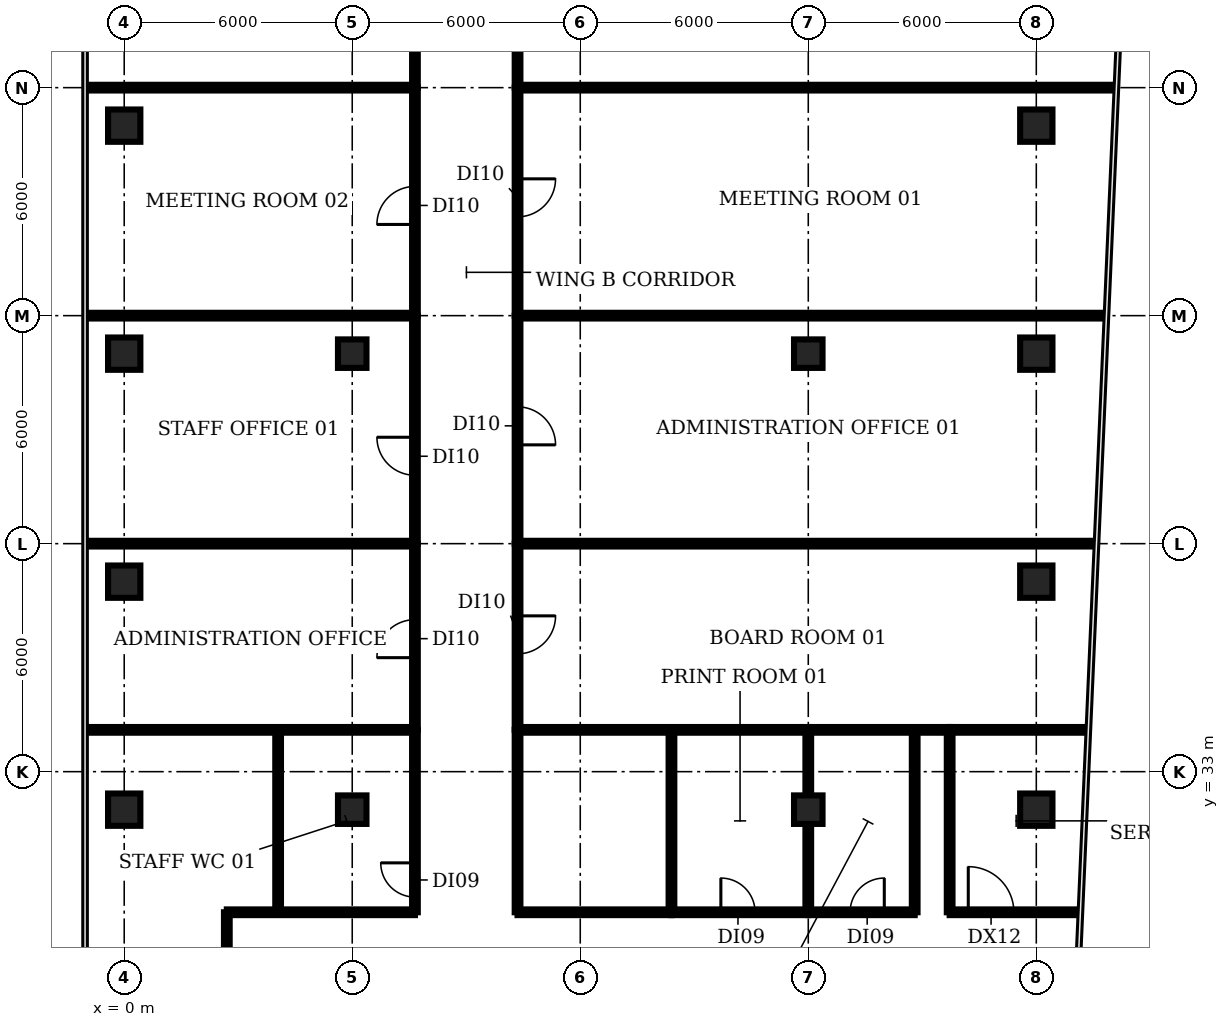
"""IFC4 building model, lengths in metres.
Left out: names, types, materials, properties, quantities, classifications, styles, units other than length and angle.
Written with IfcOpenShell. Run it as: python <this file> out.ifc"""

import sys

from ifc_helpers import new_model, si_unit, direction, frame, frame_2d, origin, origin_2d, place, context, subcontext, project, spatial, rectangle, extrude, element, fill, save


model = new_model("IFC4")
c1 = context("Model", 3, precision=1e-05, world=origin(), true_north=direction((0.0, 1.0)))
c2 = subcontext(c1, "Body", "Model", "MODEL_VIEW")
j1 = project(units=[si_unit("LENGTHUNIT", "METRE"), si_unit("PLANEANGLEUNIT", "RADIAN")], contexts=[c1])
p1 = place(None, origin())
s1 = spatial("IfcSite", under=j1, at=p1, CompositionType="ELEMENT")
p2 = place(p1, origin())
s2 = spatial("IfcBuilding", under=s1, at=p2, CompositionType="ELEMENT")
p3 = place(p2, frame((0.0, 0.0, 159.2)))
s3 = spatial("IfcBuildingStorey", under=s2, at=p3, CompositionType="ELEMENT", Elevation=159.2)
for number, where, z_axis, x_axis in (
    (1, (0.0, 32.0, 0.0), (0.0, 0.0, 1.0), (1.0, 0.0, 0.0)),
    (2, (0.0, 38.0, 0.0), (0.0, 0.0, 1.0), (1.0, 0.0, 0.0)),
    (3, (0.0, 44.0, 0.0), (0.0, 0.0, 1.0), (1.0, 0.0, 0.0)),
    (4, (0.0, 50.0, 0.0), (0.0, 0.0, 1.0), (1.0, 0.0, 0.0)),
):
    element("IfcColumn", number, at=place(p3, frame(where, z_axis=z_axis, x_axis=x_axis)), inside=s3, PredefinedType="COLUMN", context=c2, shape_type="SweptSolid", body=[
        extrude(rectangle(XDim=0.85, YDim=0.85, at=origin_2d()), origin(), (0.0, 0.0, 1.0), 3.85),
    ])
for number, where, z_axis, x_axis in (
    (5, (6.0, 32.0, 0.0), (0.0, 0.0, 1.0), (1.0, 0.0, 0.0)),
    (6, (6.0, 44.0, 0.0), (0.0, 0.0, 1.0), (1.0, 0.0, 0.0)),
    (7, (18.0, 32.0, 0.0), (0.0, 0.0, 1.0), (1.0, 0.0, 0.0)),
    (8, (18.0, 44.0, 0.0), (0.0, 0.0, 1.0), (1.0, 0.0, 0.0)),
):
    element("IfcColumn", number, at=place(p3, frame(where, z_axis=z_axis, x_axis=x_axis)), inside=s3, PredefinedType="COLUMN", context=c2, shape_type="SweptSolid", body=[
        extrude(rectangle(XDim=0.75, YDim=0.75, at=origin_2d()), origin(), (0.0, 0.0, 1.0), 3.85),
    ])
for number, where, z_axis, x_axis in (
    (9, (24.0, 32.0, 0.0), (0.0, 0.0, 1.0), (1.0, 0.0, 0.0)),
    (10, (24.0, 38.0, 0.0), (0.0, 0.0, 1.0), (1.0, 0.0, 0.0)),
    (11, (24.0, 44.0, 0.0), (0.0, 0.0, 1.0), (1.0, 0.0, 0.0)),
    (12, (24.0, 50.0, 0.0), (0.0, 0.0, 1.0), (1.0, 0.0, 0.0)),
):
    element("IfcColumn", number, at=place(p3, frame(where, z_axis=z_axis, x_axis=x_axis)), inside=s3, PredefinedType="COLUMN", context=c2, shape_type="SweptSolid", body=[
        extrude(rectangle(XDim=0.85, YDim=0.85, at=origin_2d()), origin(), (0.0, 0.0, 1.0), 3.85),
    ])
p4 = place(p3, frame((-0.98, 34.1, 0.0), z_axis=(0.0, 0.0, 1.0), x_axis=(1.0, 0.0, 0.0)))
e13 = element("IfcWall", 13, at=p4, inside=s3, PredefinedType="PARTITIONING", context=c2, shape_type="SweptSolid", body=[
    extrude(rectangle(XDim=8.63, YDim=0.15, at=frame_2d((4.315, 0.0))), origin(), (0.0, 0.0, 1.0), 2.88),
])
for number, where, z_axis, x_axis in (
    (14, (-0.965, 39.0, 0.0), (0.0, 0.0, 1.0), (1.0, 0.0, 0.0)),
    (15, (-0.965, 45.0, 0.0), (0.0, 0.0, 1.0), (1.0, 0.0, 0.0)),
    (16, (-0.965, 51.0, 0.0), (0.0, 0.0, 1.0), (1.0, 0.0, 0.0)),
):
    element("IfcWall", number, at=place(p3, frame(where, z_axis=z_axis, x_axis=x_axis)), inside=s3, PredefinedType="PARTITIONING", context=c2, shape_type="SweptSolid", body=[
        extrude(rectangle(XDim=8.615, YDim=0.15, at=frame_2d((4.308, 0.0))), origin(), (0.0, 0.0, 1.0), 2.88),
    ])
p5 = place(p3, frame((2.7, 25.4, 0.0), z_axis=(0.0, 0.0, 1.0), x_axis=(0.0, 1.0, 0.0)))
e17 = element("IfcWall", 17, at=p5, inside=s3, PredefinedType="PARTITIONING", context=c2, shape_type="SweptSolid", body=[
    extrude(rectangle(XDim=3.9, YDim=0.15, at=frame_2d((1.95, 0.0))), origin(), (0.0, 0.0, 1.0), 2.88),
])
p6 = place(p3, frame((2.7, 29.3, 0.0), z_axis=(0.0, 0.0, 1.0), x_axis=(1.0, 0.0, 0.0)))
e18 = element("IfcWall", 18, at=p6, inside=s3, PredefinedType="PARTITIONING", context=c2, shape_type="SweptSolid", body=[
    extrude(rectangle(XDim=4.95, YDim=0.15, at=frame_2d((2.475, 0.0))), origin(), (0.0, 0.0, 1.0), 2.88),
])
p7 = place(p3, frame((4.05, 29.3, 0.0), z_axis=(0.0, 0.0, 1.0), x_axis=(0.0, 1.0, 0.0)))
e19 = element("IfcWall", 19, at=p7, inside=s3, PredefinedType="PARTITIONING", context=c2, shape_type="SweptSolid", body=[
    extrude(rectangle(XDim=4.8, YDim=0.15, at=frame_2d((2.4, 0.0))), origin(), (0.0, 0.0, 1.0), 2.88),
])
p8 = place(p3, frame((7.65, 29.3, 0.0), z_axis=(0.0, 0.0, 1.0), x_axis=(0.0, 1.0, 0.0)))
e20 = element("IfcWall", 20, at=p8, inside=s3, PredefinedType="PARTITIONING", context=c2, shape_type="SweptSolid", body=[
    extrude(rectangle(XDim=4.8, YDim=0.15, at=frame_2d((2.4, 0.0))), origin(), (0.0, 0.0, 1.0), 2.88),
])
p9 = place(p8, frame((0.4, 0.0, 0.0)))
e21 = element("IfcOpeningElement", 21, at=p9, cuts=e20, PredefinedType="OPENING", context=c2, shape_type="SweptSolid", body=[
    extrude(rectangle(XDim=0.9, YDim=2.1, at=frame_2d((0.45, 1.05))), frame((0.0, 0.085, 0.0), z_axis=(0.0, -1.0, 0.0), x_axis=(1.0, 0.0, 0.0)), (0.0, 0.0, 1.0), 0.17),
])
p10 = place(p3, frame((7.65, 34.1, 0.0), z_axis=(0.0, 0.0, 1.0), x_axis=(0.0, 1.0, 0.0)))
e22 = element("IfcWall", 22, at=p10, inside=s3, PredefinedType="PARTITIONING", context=c2, shape_type="SweptSolid", body=[
    extrude(rectangle(XDim=4.9, YDim=0.15, at=frame_2d((2.45, 0.0))), origin(), (0.0, 0.0, 1.0), 2.88),
])
p11 = place(p10, frame((1.9, 0.0, 0.0)))
e23 = element("IfcOpeningElement", 23, at=p11, cuts=e22, PredefinedType="OPENING", context=c2, shape_type="SweptSolid", body=[
    extrude(rectangle(XDim=1.0, YDim=2.1, at=frame_2d((0.5, 1.05))), frame((0.0, 0.085, 0.0), z_axis=(0.0, -1.0, 0.0), x_axis=(1.0, 0.0, 0.0)), (0.0, 0.0, 1.0), 0.17),
])
p12 = place(p3, frame((7.65, 39.0, 0.0), z_axis=(0.0, 0.0, 1.0), x_axis=(0.0, 1.0, 0.0)))
e24 = element("IfcWall", 24, at=p12, inside=s3, PredefinedType="PARTITIONING", context=c2, shape_type="SweptSolid", body=[
    extrude(rectangle(XDim=6.0, YDim=0.15, at=frame_2d((3.0, 0.0))), origin(), (0.0, 0.0, 1.0), 2.88),
])
p13 = place(p12, frame((1.8, 0.0, 0.0)))
e25 = element("IfcOpeningElement", 25, at=p13, cuts=e24, PredefinedType="OPENING", context=c2, shape_type="SweptSolid", body=[
    extrude(rectangle(XDim=1.0, YDim=2.1, at=frame_2d((0.5, 1.05))), frame((0.0, 0.085, 0.0), z_axis=(0.0, -1.0, 0.0), x_axis=(1.0, 0.0, 0.0)), (0.0, 0.0, 1.0), 0.17),
])
p14 = place(p3, frame((7.65, 45.0, 0.0), z_axis=(0.0, 0.0, 1.0), x_axis=(0.0, 1.0, 0.0)))
e26 = element("IfcWall", 26, at=p14, inside=s3, PredefinedType="PARTITIONING", context=c2, shape_type="SweptSolid", body=[
    extrude(rectangle(XDim=6.0, YDim=0.15, at=frame_2d((3.0, 0.0))), origin(), (0.0, 0.0, 1.0), 2.88),
])
p15 = place(p14, frame((2.4, 0.0, 0.0)))
e27 = element("IfcOpeningElement", 27, at=p15, cuts=e26, PredefinedType="OPENING", context=c2, shape_type="SweptSolid", body=[
    extrude(rectangle(XDim=1.0, YDim=2.1, at=frame_2d((0.5, 1.05))), frame((0.0, 0.085, 0.0), z_axis=(0.0, -1.0, 0.0), x_axis=(1.0, 0.0, 0.0)), (0.0, 0.0, 1.0), 0.17),
])
p16 = place(p3, frame((7.65, 51.0, 0.0), z_axis=(0.0, 0.0, 1.0), x_axis=(0.0, 1.0, 0.0)))
e28 = element("IfcWall", 28, at=p16, inside=s3, PredefinedType="PARTITIONING", context=c2, shape_type="SweptSolid", body=[
    extrude(rectangle(XDim=12.09, YDim=0.15, at=frame_2d((6.045, 0.0))), origin(), (0.0, 0.0, 1.0), 2.88),
])
p17 = place(p16, frame((6.98, 0.0, 0.0)))
e29 = element("IfcOpeningElement", 29, at=p17, cuts=e28, PredefinedType="OPENING", context=c2, shape_type="SweptSolid", body=[
    extrude(rectangle(XDim=1.2, YDim=2.1, at=frame_2d((0.6, 1.05))), frame((0.0, 0.085, 0.0), z_axis=(0.0, -1.0, 0.0), x_axis=(1.0, 0.0, 0.0)), (0.0, 0.0, 1.0), 0.17),
])
p18 = place(p3, frame((10.35, 29.3, 0.0), z_axis=(0.0, 0.0, 1.0), x_axis=(0.0, 1.0, 0.0)))
e30 = element("IfcWall", 30, at=p18, inside=s3, PredefinedType="PARTITIONING", context=c2, shape_type="SweptSolid", body=[
    extrude(rectangle(XDim=4.8, YDim=0.15, at=frame_2d((2.4, 0.0))), origin(), (0.0, 0.0, 1.0), 2.88),
])
p19 = place(p3, frame((10.35, 29.3, 0.0), z_axis=(0.0, 0.0, 1.0), x_axis=(1.0, 0.0, 0.0)))
e31 = element("IfcWall", 31, at=p19, inside=s3, PredefinedType="PARTITIONING", context=c2, shape_type="SweptSolid", body=[
    extrude(rectangle(XDim=4.05, YDim=0.15, at=frame_2d((2.025, 0.0))), origin(), (0.0, 0.0, 1.0), 2.88),
])
p20 = place(p3, frame((10.35, 34.1, 0.0), z_axis=(0.0, 0.0, 1.0), x_axis=(1.0, 0.0, 0.0)))
e32 = element("IfcWall", 32, at=p20, inside=s3, PredefinedType="PARTITIONING", context=c2, shape_type="SweptSolid", body=[
    extrude(rectangle(XDim=11.37, YDim=0.15, at=frame_2d((5.685, 0.0))), origin(), (0.0, 0.0, 1.0), 2.88),
])
p21 = place(p3, frame((10.35, 39.0, 0.0), z_axis=(0.0, 0.0, 1.0), x_axis=(0.0, -1.0, 0.0)))
e33 = element("IfcWall", 33, at=p21, inside=s3, PredefinedType="PARTITIONING", context=c2, shape_type="SweptSolid", body=[
    extrude(rectangle(XDim=4.9, YDim=0.15, at=frame_2d((2.45, 0.0))), origin(), (0.0, 0.0, 1.0), 2.88),
])
p22 = place(p21, frame((1.9, 0.0, 0.0)))
e34 = element("IfcOpeningElement", 34, at=p22, cuts=e33, PredefinedType="OPENING", context=c2, shape_type="SweptSolid", body=[
    extrude(rectangle(XDim=1.0, YDim=2.1, at=frame_2d((0.5, 1.05))), frame((0.0, 0.085, 0.0), z_axis=(0.0, -1.0, 0.0), x_axis=(1.0, 0.0, 0.0)), (0.0, 0.0, 1.0), 0.17),
])
p23 = place(p3, frame((10.35, 39.0, 0.0), z_axis=(0.0, 0.0, 1.0), x_axis=(1.0, 0.0, 0.0)))
e35 = element("IfcWall", 35, at=p23, inside=s3, PredefinedType="PARTITIONING", context=c2, shape_type="SweptSolid", body=[
    extrude(rectangle(XDim=15.18, YDim=0.15, at=frame_2d((7.59, 0.0))), origin(), (0.0, 0.0, 1.0), 2.88),
])
p24 = place(p3, frame((10.35, 45.0, 0.0), z_axis=(0.0, 0.0, 1.0), x_axis=(0.0, -1.0, 0.0)))
e36 = element("IfcWall", 36, at=p24, inside=s3, PredefinedType="PARTITIONING", context=c2, shape_type="SweptSolid", body=[
    extrude(rectangle(XDim=6.0, YDim=0.15, at=frame_2d((3.0, 0.0))), origin(), (0.0, 0.0, 1.0), 2.88),
])
p25 = place(p24, frame((2.4, 0.0, 0.0)))
e37 = element("IfcOpeningElement", 37, at=p25, cuts=e36, PredefinedType="OPENING", context=c2, shape_type="SweptSolid", body=[
    extrude(rectangle(XDim=1.0, YDim=2.1, at=frame_2d((0.5, 1.05))), frame((0.0, 0.085, 0.0), z_axis=(0.0, -1.0, 0.0), x_axis=(1.0, 0.0, 0.0)), (0.0, 0.0, 1.0), 0.17),
])
p26 = place(p3, frame((10.35, 45.0, 0.0), z_axis=(0.0, 0.0, 1.0), x_axis=(1.0, 0.0, 0.0)))
e38 = element("IfcWall", 38, at=p26, inside=s3, PredefinedType="PARTITIONING", context=c2, shape_type="SweptSolid", body=[
    extrude(rectangle(XDim=15.45, YDim=0.15, at=frame_2d((7.725, 0.0))), origin(), (0.0, 0.0, 1.0), 2.88),
])
p27 = place(p3, frame((10.35, 51.0, 0.0), z_axis=(0.0, 0.0, 1.0), x_axis=(0.0, -1.0, 0.0)))
e39 = element("IfcWall", 39, at=p27, inside=s3, PredefinedType="PARTITIONING", context=c2, shape_type="SweptSolid", body=[
    extrude(rectangle(XDim=6.0, YDim=0.15, at=frame_2d((3.0, 0.0))), origin(), (0.0, 0.0, 1.0), 2.88),
])
p28 = place(p27, frame((2.4, 0.0, 0.0)))
e40 = element("IfcOpeningElement", 40, at=p28, cuts=e39, PredefinedType="OPENING", context=c2, shape_type="SweptSolid", body=[
    extrude(rectangle(XDim=1.0, YDim=2.1, at=frame_2d((0.5, 1.05))), frame((0.0, 0.085, 0.0), z_axis=(0.0, -1.0, 0.0), x_axis=(1.0, 0.0, 0.0)), (0.0, 0.0, 1.0), 0.17),
])
p29 = place(p3, frame((10.35, 51.0, 0.0), z_axis=(0.0, 0.0, 1.0), x_axis=(1.0, 0.0, 0.0)))
e41 = element("IfcWall", 41, at=p29, inside=s3, PredefinedType="PARTITIONING", context=c2, shape_type="SweptSolid", body=[
    extrude(rectangle(XDim=15.71, YDim=0.15, at=frame_2d((7.855, 0.0))), origin(), (0.0, 0.0, 1.0), 2.88),
])
p30 = place(p3, frame((10.35, 63.09, 0.0), z_axis=(0.0, 0.0, 1.0), x_axis=(0.0, -1.0, 0.0)))
e42 = element("IfcWall", 42, at=p30, inside=s3, PredefinedType="PARTITIONING", context=c2, shape_type="SweptSolid", body=[
    extrude(rectangle(XDim=12.09, YDim=0.15, at=frame_2d((6.045, 0.0))), origin(), (0.0, 0.0, 1.0), 2.88),
])
p31 = place(p30, frame((5.59, 0.0, 0.0)))
e43 = element("IfcOpeningElement", 43, at=p31, cuts=e42, PredefinedType="OPENING", context=c2, shape_type="SweptSolid", body=[
    extrude(rectangle(XDim=1.2, YDim=2.1, at=frame_2d((0.6, 1.05))), frame((0.0, 0.085, 0.0), z_axis=(0.0, -1.0, 0.0), x_axis=(1.0, 0.0, 0.0)), (0.0, 0.0, 1.0), 0.17),
])
p32 = place(p3, frame((14.4, 29.3, 0.0), z_axis=(0.0, 0.0, 1.0), x_axis=(0.0, 1.0, 0.0)))
e44 = element("IfcWall", 44, at=p32, inside=s3, PredefinedType="PARTITIONING", context=c2, shape_type="SweptSolid", body=[
    extrude(rectangle(XDim=4.8, YDim=0.15, at=frame_2d((2.4, 0.0))), origin(), (0.0, 0.0, 1.0), 2.88),
])
p33 = place(p3, frame((14.4, 29.3, 0.0), z_axis=(0.0, 0.0, 1.0), x_axis=(1.0, 0.0, 0.0)))
e45 = element("IfcWall", 45, at=p33, inside=s3, PredefinedType="PARTITIONING", context=c2, shape_type="SweptSolid", body=[
    extrude(rectangle(XDim=3.6, YDim=0.15, at=frame_2d((1.8, 0.0))), origin(), (0.0, 0.0, 1.0), 2.88),
])
p34 = place(p33, frame((1.3, 0.0, 0.0)))
e46 = element("IfcOpeningElement", 46, at=p34, cuts=e45, PredefinedType="OPENING", context=c2, shape_type="SweptSolid", body=[
    extrude(rectangle(XDim=0.9, YDim=2.1, at=frame_2d((0.45, 1.05))), frame((0.0, 0.085, 0.0), z_axis=(0.0, -1.0, 0.0), x_axis=(1.0, 0.0, 0.0)), (0.0, 0.0, 1.0), 0.17),
])
p35 = place(p3, frame((18.0, 29.3, 0.0), z_axis=(0.0, 0.0, 1.0), x_axis=(0.0, 1.0, 0.0)))
e47 = element("IfcWall", 47, at=p35, inside=s3, PredefinedType="PARTITIONING", context=c2, shape_type="SweptSolid", body=[
    extrude(rectangle(XDim=4.8, YDim=0.15, at=frame_2d((2.4, 0.0))), origin(), (0.0, 0.0, 1.0), 2.88),
])
p36 = place(p3, frame((18.0, 29.3, 0.0), z_axis=(0.0, 0.0, 1.0), x_axis=(1.0, 0.0, 0.0)))
e48 = element("IfcWall", 48, at=p36, inside=s3, PredefinedType="PARTITIONING", context=c2, shape_type="SweptSolid", body=[
    extrude(rectangle(XDim=2.8, YDim=0.15, at=frame_2d((1.4, 0.0))), origin(), (0.0, 0.0, 1.0), 2.88),
])
p37 = place(p36, frame((1.1, 0.0, 0.0)))
e49 = element("IfcOpeningElement", 49, at=p37, cuts=e48, PredefinedType="OPENING", context=c2, shape_type="SweptSolid", body=[
    extrude(rectangle(XDim=0.9, YDim=2.1, at=frame_2d((0.45, 1.05))), frame((0.0, 0.085, 0.0), z_axis=(0.0, -1.0, 0.0), x_axis=(1.0, 0.0, 0.0)), (0.0, 0.0, 1.0), 0.17),
])
for number, where, z_axis, x_axis in (
    (50, (20.8, 29.3, 0.0), (0.0, 0.0, 1.0), (0.0, 1.0, 0.0)),
    (51, (21.72, 29.3, 0.0), (0.0, 0.0, 1.0), (0.0, 1.0, 0.0)),
):
    element("IfcWall", number, at=place(p3, frame(where, z_axis=z_axis, x_axis=x_axis)), inside=s3, PredefinedType="PARTITIONING", context=c2, shape_type="SweptSolid", body=[
        extrude(rectangle(XDim=4.8, YDim=0.15, at=frame_2d((2.4, 0.0))), origin(), (0.0, 0.0, 1.0), 2.88),
    ])
p38 = place(p3, frame((21.72, 29.3, 0.0), z_axis=(0.0, 0.0, 1.0), x_axis=(1.0, 0.0, 0.0)))
e52 = element("IfcWall", 52, at=p38, inside=s3, PredefinedType="PARTITIONING", context=c2, shape_type="SweptSolid", body=[
    extrude(rectangle(XDim=3.39, YDim=0.15, at=frame_2d((1.695, 0.0))), origin(), (0.0, 0.0, 1.0), 2.88),
])
p39 = place(p38, frame((0.49, 0.0, 0.0)))
e53 = element("IfcOpeningElement", 53, at=p39, cuts=e52, PredefinedType="OPENING", context=c2, shape_type="SweptSolid", body=[
    extrude(rectangle(XDim=1.2, YDim=2.1, at=frame_2d((0.6, 1.05))), frame((0.0, 0.085, 0.0), z_axis=(0.0, -1.0, 0.0), x_axis=(1.0, 0.0, 0.0)), (0.0, 0.0, 1.0), 0.17),
])
p40 = place(p3, frame((21.72, 34.1, 0.0), z_axis=(0.0, 0.0, 1.0), x_axis=(1.0, 0.0, 0.0)))
e54 = element("IfcWall", 54, at=p40, inside=s3, PredefinedType="PARTITIONING", context=c2, shape_type="SweptSolid", body=[
    extrude(rectangle(XDim=3.6, YDim=0.15, at=frame_2d((1.8, 0.0))), origin(), (0.0, 0.0, 1.0), 2.88),
])
p41 = place(p9, origin())
e55 = element("IfcDoor", 55, at=p41, inside=s3, OperationType="SINGLE_SWING_RIGHT", PredefinedType="DOOR", context=c2, shape_type="SweptSolid", body=[
    extrude(rectangle(XDim=0.9, YDim=2.1, at=frame_2d((0.45, 1.05))), frame((0.0, 0.025, 0.0), z_axis=(0.0, -1.0, 0.0), x_axis=(1.0, 0.0, 0.0)), (0.0, 0.0, 1.0), 0.05),
])
fill(e21, e55)
p42 = place(p11, origin())
e56 = element("IfcDoor", 56, at=p42, inside=s3, OperationType="SINGLE_SWING_LEFT", PredefinedType="DOOR", context=c2, shape_type="SweptSolid", body=[
    extrude(rectangle(XDim=1.0, YDim=2.1, at=frame_2d((0.5, 1.05))), frame((0.0, 0.025, 0.0), z_axis=(0.0, -1.0, 0.0), x_axis=(1.0, 0.0, 0.0)), (0.0, 0.0, 1.0), 0.05),
])
fill(e23, e56)
p43 = place(p13, origin())
e57 = element("IfcDoor", 57, at=p43, inside=s3, OperationType="SINGLE_SWING_RIGHT", PredefinedType="DOOR", context=c2, shape_type="SweptSolid", body=[
    extrude(rectangle(XDim=1.0, YDim=2.1, at=frame_2d((0.5, 1.05))), frame((0.0, 0.025, 0.0), z_axis=(0.0, -1.0, 0.0), x_axis=(1.0, 0.0, 0.0)), (0.0, 0.0, 1.0), 0.05),
])
fill(e25, e57)
p44 = place(p15, origin())
e58 = element("IfcDoor", 58, at=p44, inside=s3, OperationType="SINGLE_SWING_LEFT", PredefinedType="DOOR", context=c2, shape_type="SweptSolid", body=[
    extrude(rectangle(XDim=1.0, YDim=2.1, at=frame_2d((0.5, 1.05))), frame((0.0, 0.025, 0.0), z_axis=(0.0, -1.0, 0.0), x_axis=(1.0, 0.0, 0.0)), (0.0, 0.0, 1.0), 0.05),
])
fill(e27, e58)
p45 = place(p22, origin())
e59 = element("IfcDoor", 59, at=p45, inside=s3, OperationType="SINGLE_SWING_LEFT", PredefinedType="DOOR", context=c2, shape_type="SweptSolid", body=[
    extrude(rectangle(XDim=1.0, YDim=2.1, at=frame_2d((0.5, 1.05))), frame((0.0, 0.025, 0.0), z_axis=(0.0, -1.0, 0.0), x_axis=(1.0, 0.0, 0.0)), (0.0, 0.0, 1.0), 0.05),
])
fill(e34, e59)
p46 = place(p25, origin())
e60 = element("IfcDoor", 60, at=p46, inside=s3, OperationType="SINGLE_SWING_RIGHT", PredefinedType="DOOR", context=c2, shape_type="SweptSolid", body=[
    extrude(rectangle(XDim=1.0, YDim=2.1, at=frame_2d((0.5, 1.05))), frame((0.0, 0.025, 0.0), z_axis=(0.0, -1.0, 0.0), x_axis=(1.0, 0.0, 0.0)), (0.0, 0.0, 1.0), 0.05),
])
fill(e37, e60)
p47 = place(p28, origin())
e61 = element("IfcDoor", 61, at=p47, inside=s3, OperationType="SINGLE_SWING_LEFT", PredefinedType="DOOR", context=c2, shape_type="SweptSolid", body=[
    extrude(rectangle(XDim=1.0, YDim=2.1, at=frame_2d((0.5, 1.05))), frame((0.0, 0.025, 0.0), z_axis=(0.0, -1.0, 0.0), x_axis=(1.0, 0.0, 0.0)), (0.0, 0.0, 1.0), 0.05),
])
fill(e40, e61)
p48 = place(p34, origin())
e62 = element("IfcDoor", 62, at=p48, inside=s3, OperationType="SINGLE_SWING_LEFT", PredefinedType="DOOR", context=c2, shape_type="SweptSolid", body=[
    extrude(rectangle(XDim=0.9, YDim=2.1, at=frame_2d((0.45, 1.05))), frame((0.0, 0.025, 0.0), z_axis=(0.0, -1.0, 0.0), x_axis=(1.0, 0.0, 0.0)), (0.0, 0.0, 1.0), 0.05),
])
fill(e46, e62)
p49 = place(p37, origin())
e63 = element("IfcDoor", 63, at=p49, inside=s3, OperationType="SINGLE_SWING_RIGHT", PredefinedType="DOOR", context=c2, shape_type="SweptSolid", body=[
    extrude(rectangle(XDim=0.9, YDim=2.1, at=frame_2d((0.45, 1.05))), frame((0.0, 0.025, 0.0), z_axis=(0.0, -1.0, 0.0), x_axis=(1.0, 0.0, 0.0)), (0.0, 0.0, 1.0), 0.05),
])
fill(e49, e63)
p50 = place(p39, origin())
e64 = element("IfcDoor", 64, at=p50, inside=s3, OperationType="SINGLE_SWING_LEFT", PredefinedType="DOOR", context=c2, shape_type="SweptSolid", body=[
    extrude(rectangle(XDim=1.2, YDim=2.1, at=frame_2d((0.6, 1.05))), frame((0.0, 0.025, 0.0), z_axis=(0.0, -1.0, 0.0), x_axis=(1.0, 0.0, 0.0)), (0.0, 0.0, 1.0), 0.05),
])
fill(e53, e64)
save(model, sys.argv[1])
